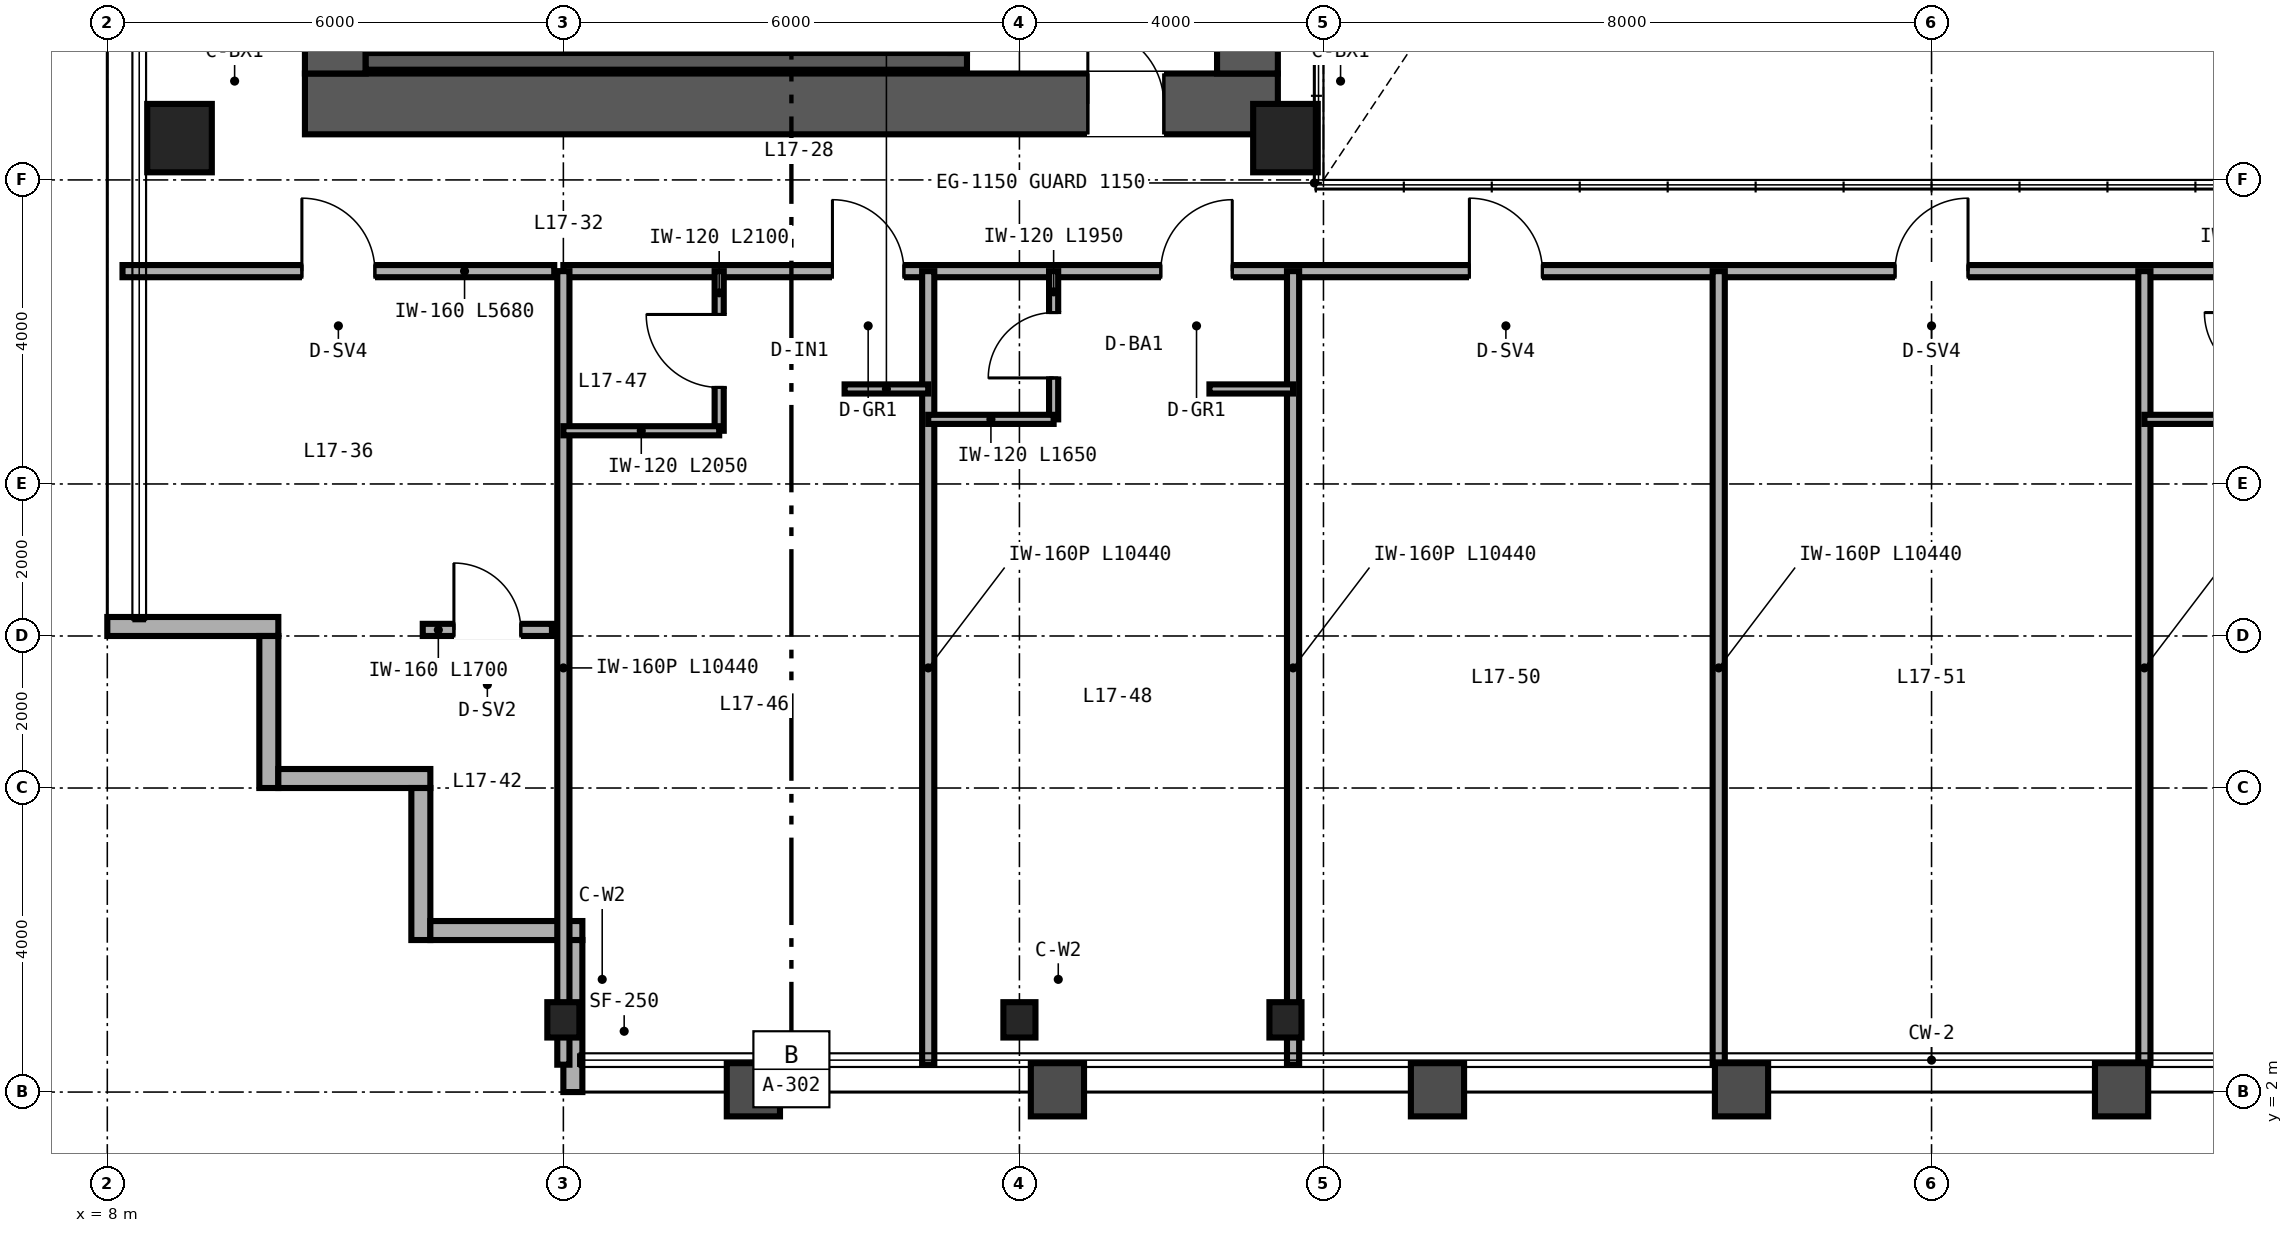
"""IFC4 building model, lengths in metres.
Left out: names, types, materials, properties, quantities, classifications, styles, units other than length and angle.
Written with IfcOpenShell. Run it as: python <this file> out.ifc"""

import sys

from ifc_helpers import new_model, si_unit, direction, frame, frame_2d, origin, origin_2d, place, context, subcontext, project, spatial, rectangle, hollow_rectangle, i_section, extrude, source, transform, mapped, element, fill, save


model = new_model("IFC4")
c1 = context("Model", 3, precision=1e-05, world=origin(), true_north=direction((0.0, 1.0)))
c2 = subcontext(c1, "Body", "Model", "MODEL_VIEW")
j1 = project(units=[si_unit("LENGTHUNIT", "METRE"), si_unit("PLANEANGLEUNIT", "RADIAN")], contexts=[c1])
p1 = place(None, origin())
s1 = spatial("IfcSite", under=j1, at=p1, CompositionType="ELEMENT")
p2 = place(p1, origin())
s2 = spatial("IfcBuilding", under=s1, at=p2, CompositionType="ELEMENT")
p3 = place(p2, frame((0.0, 0.0, 70.8)))
s3 = spatial("IfcBuildingStorey", under=s2, at=p3, CompositionType="ELEMENT", Elevation=70.8)
p4 = place(p3, frame((10.6, 15.0, 0.0), z_axis=(0.0, 0.0, 1.0), x_axis=(1.0, 0.0, 0.0)))
e1 = element("IfcWall", 1, at=p4, inside=s3, PredefinedType="SHEAR", context=c2, shape_type="SweptSolid", body=[
    extrude(rectangle(XDim=12.8, YDim=0.8, at=frame_2d((6.4, 0.0))), origin(), (0.0, 0.0, 1.0), 3.35),
])
p5 = place(p4, frame((10.3, 0.0, 0.0)))
e2 = element("IfcOpeningElement", 2, at=p5, cuts=e1, PredefinedType="OPENING", context=c2, shape_type="SweptSolid", body=[
    extrude(rectangle(XDim=1.0, YDim=2.15, at=frame_2d((0.5, 1.075))), frame((0.0, 0.41, 0.0), z_axis=(0.0, -1.0, 0.0), x_axis=(1.0, 0.0, 0.0)), (0.0, 0.0, 1.0), 0.82),
])
for number, where, z_axis, x_axis in (
    (3, (11.0, 15.4, 0.0), (0.0, 0.0, 1.0), (0.0, 1.0, 0.0)),
    (4, (23.0, 15.4, 0.0), (0.0, 0.0, 1.0), (0.0, 1.0, 0.0)),
):
    element("IfcWall", number, at=place(p3, frame(where, z_axis=z_axis, x_axis=x_axis)), inside=s3, PredefinedType="SHEAR", context=c2, shape_type="SweptSolid", body=[
        extrude(rectangle(XDim=21.2, YDim=0.8, at=frame_2d((10.6, 0.0))), origin(), (0.0, 0.0, 1.0), 3.35),
    ])
p6 = place(p3, frame((11.4, 15.56, 0.0), z_axis=(0.0, 0.0, 1.0), x_axis=(1.0, 0.0, 0.0)))
e5 = element("IfcWall", 5, at=p6, inside=s3, PredefinedType="SHEAR", context=c2, shape_type="SweptSolid", body=[
    extrude(rectangle(XDim=7.91, YDim=0.22, at=frame_2d((3.955, 0.0))), origin(), (0.0, 0.0, 1.0), 3.4),
])
for number, where, z_axis, x_axis in (
    (6, (11.56, 15.67, 0.0), (0.0, 0.0, 1.0), (0.0, 1.0, 0.0)),
    (7, (19.2, 15.67, 0.0), (0.0, 0.0, 1.0), (0.0, 1.0, 0.0)),
):
    element("IfcWall", number, at=place(p3, frame(where, z_axis=z_axis, x_axis=x_axis)), inside=s3, PredefinedType="SHEAR", context=c2, shape_type="SweptSolid", body=[
        extrude(rectangle(XDim=3.28, YDim=0.22, at=frame_2d((1.64, 0.0))), origin(), (0.0, 0.0, 1.0), 3.4),
    ])
m1 = source(origin(), c2, "Body", "SweptSolid", [
    extrude(hollow_rectangle(XDim=0.85, YDim=0.9, WallThickness=0.04, at=origin_2d()), origin(), (0.0, 0.0, 1.0), 3.35),
])
for number, where, z_axis, x_axis in (
    (8, (8.95, 14.55, 0.0), (0.0, 0.0, 1.0), (1.0, 0.0, 0.0)),
    (9, (23.5, 14.55, 0.0), (0.0, 0.0, 1.0), (1.0, 0.0, 0.0)),
):
    element("IfcColumn", number, at=place(p3, frame(where, z_axis=z_axis, x_axis=x_axis)), inside=s3, PredefinedType="COLUMN", context=c2, shape_type="MappedRepresentation", body=[
        mapped(m1, transform((0.0, 0.0, 0.0), scale=1.0)),
    ])
m2 = source(origin(), c2, "Body", "SweptSolid", [
    extrude(i_section(OverallWidth=0.422, OverallDepth=0.465, WebThickness=0.045, FlangeThickness=0.073, FilletRadius=0.025, at=origin_2d()), origin(), (0.0, 0.0, 1.0), 3.35),
])
for number, where, z_axis, x_axis in (
    (10, (14.0, 2.95, 0.0), (0.0, 0.0, 1.0), (1.0, 0.0, 0.0)),
    (11, (20.0, 2.95, 0.0), (0.0, 0.0, 1.0), (1.0, 0.0, 0.0)),
    (12, (23.5, 2.95, 0.0), (0.0, 0.0, 1.0), (1.0, 0.0, 0.0)),
):
    element("IfcColumn", number, at=place(p3, frame(where, z_axis=z_axis, x_axis=x_axis)), inside=s3, PredefinedType="COLUMN", context=c2, shape_type="MappedRepresentation", body=[
        mapped(m2, transform((0.0, 0.0, 0.0), scale=1.0)),
    ])
p7 = place(p3, frame((8.0, 8.125, 0.0), z_axis=(0.0, 0.0, 1.0), x_axis=(1.0, 0.0, 0.0)))
e13 = element("IfcWall", 13, at=p7, inside=s3, PredefinedType="SOLIDWALL", context=c2, shape_type="SweptSolid", body=[
    extrude(rectangle(XDim=2.25, YDim=0.25, at=frame_2d((1.125, 0.0))), origin(), (0.0, 0.0, 1.0), 3.35),
])
for number, where, z_axis, x_axis in (
    (14, (10.125, 8.0, 0.0), (0.0, 0.0, 1.0), (0.0, -1.0, 0.0)),
    (15, (10.25, 6.125, 0.0), (0.0, 0.0, 1.0), (1.0, 0.0, 0.0)),
    (16, (12.125, 6.0, 0.0), (0.0, 0.0, 1.0), (0.0, -1.0, 0.0)),
    (17, (12.25, 4.125, 0.0), (0.0, 0.0, 1.0), (1.0, 0.0, 0.0)),
):
    element("IfcWall", number, at=place(p3, frame(where, z_axis=z_axis, x_axis=x_axis)), inside=s3, PredefinedType="SOLIDWALL", context=c2, shape_type="SweptSolid", body=[
        extrude(rectangle(XDim=2.0, YDim=0.25, at=frame_2d((1.0, 0.0))), origin(), (0.0, 0.0, 1.0), 3.35),
    ])
p8 = place(p3, frame((14.125, 4.0, 0.0), z_axis=(0.0, 0.0, 1.0), x_axis=(0.0, -1.0, 0.0)))
e18 = element("IfcWall", 18, at=p8, inside=s3, PredefinedType="SOLIDWALL", context=c2, shape_type="SweptSolid", body=[
    extrude(rectangle(XDim=2.0, YDim=0.25, at=frame_2d((1.0, 0.0))), origin(), (0.0, 0.0, 1.0), 2.657),
])
p9 = place(p3, frame((8.2, 12.8, 0.0), z_axis=(0.0, 0.0, 1.0), x_axis=(1.0, 0.0, 0.0)))
e19 = element("IfcWall", 19, at=p9, inside=s3, PredefinedType="PARTITIONING", context=c2, shape_type="SweptSolid", body=[
    extrude(rectangle(XDim=5.68, YDim=0.16, at=frame_2d((2.84, 0.0))), origin(), (0.0, 0.0, 1.0), 3.35),
])
p10 = place(p9, frame((2.36, 0.0, 0.0)))
e20 = element("IfcOpeningElement", 20, at=p10, cuts=e19, PredefinedType="OPENING", context=c2, shape_type="SweptSolid", body=[
    extrude(rectangle(XDim=0.96, YDim=2.15, at=frame_2d((0.48, 1.075))), frame((0.0, 0.09, 0.0), z_axis=(0.0, -1.0, 0.0), x_axis=(1.0, 0.0, 0.0)), (0.0, 0.0, 1.0), 0.18),
])
p11 = place(p3, frame((12.15, 8.08, 0.0), z_axis=(0.0, 0.0, 1.0), x_axis=(1.0, 0.0, 0.0)))
e21 = element("IfcWall", 21, at=p11, inside=s3, PredefinedType="PARTITIONING", context=c2, shape_type="SweptSolid", body=[
    extrude(rectangle(XDim=1.7, YDim=0.16, at=frame_2d((0.85, 0.0))), origin(), (0.0, 0.0, 1.0), 3.35),
])
p12 = place(p11, frame((0.41, 0.0, 0.0)))
e22 = element("IfcOpeningElement", 22, at=p12, cuts=e21, PredefinedType="OPENING", context=c2, shape_type="SweptSolid", body=[
    extrude(rectangle(XDim=0.88, YDim=2.15, at=frame_2d((0.44, 1.075))), frame((0.0, 0.09, 0.0), z_axis=(0.0, -1.0, 0.0), x_axis=(1.0, 0.0, 0.0)), (0.0, 0.0, 1.0), 0.18),
])
p13 = place(p3, frame((14.0, 12.8, 0.0), z_axis=(0.0, 0.0, 1.0), x_axis=(1.0, 0.0, 0.0)))
e23 = element("IfcWall", 23, at=p13, inside=s3, PredefinedType="PARTITIONING", context=c2, shape_type="SweptSolid", body=[
    extrude(rectangle(XDim=36.0, YDim=0.16, at=frame_2d((18.0, 0.0))), origin(), (0.0, 0.0, 1.0), 2.571),
])
p14 = place(p13, frame((3.54, 0.0, 0.0)))
e24 = element("IfcOpeningElement", 24, at=p14, cuts=e23, PredefinedType="OPENING", context=c2, shape_type="SweptSolid", body=[
    extrude(rectangle(XDim=0.94, YDim=2.15, at=frame_2d((0.47, 1.075))), frame((0.0, 0.09, 0.0), z_axis=(0.0, -1.0, 0.0), x_axis=(1.0, 0.0, 0.0)), (0.0, 0.0, 1.0), 0.18),
])
p15 = place(p13, frame((7.86, 0.0, 0.0)))
e25 = element("IfcOpeningElement", 25, at=p15, cuts=e23, PredefinedType="OPENING", context=c2, shape_type="SweptSolid", body=[
    extrude(rectangle(XDim=0.94, YDim=2.15, at=frame_2d((0.47, 1.075))), frame((0.0, 0.09, 0.0), z_axis=(0.0, -1.0, 0.0), x_axis=(1.0, 0.0, 0.0)), (0.0, 0.0, 1.0), 0.18),
])
p16 = place(p13, frame((11.92, 0.0, 0.0)))
e26 = element("IfcOpeningElement", 26, at=p16, cuts=e23, PredefinedType="OPENING", context=c2, shape_type="SweptSolid", body=[
    extrude(rectangle(XDim=0.96, YDim=2.15, at=frame_2d((0.48, 1.075))), frame((0.0, 0.09, 0.0), z_axis=(0.0, -1.0, 0.0), x_axis=(1.0, 0.0, 0.0)), (0.0, 0.0, 1.0), 0.18),
])
p17 = place(p13, frame((17.52, 0.0, 0.0)))
e27 = element("IfcOpeningElement", 27, at=p17, cuts=e23, PredefinedType="OPENING", context=c2, shape_type="SweptSolid", body=[
    extrude(rectangle(XDim=0.96, YDim=2.15, at=frame_2d((0.48, 1.075))), frame((0.0, 0.09, 0.0), z_axis=(0.0, -1.0, 0.0), x_axis=(1.0, 0.0, 0.0)), (0.0, 0.0, 1.0), 0.18),
])
p18 = place(p13, frame((24.74, 0.0, 0.0)))
e28 = element("IfcOpeningElement", 28, at=p18, cuts=e23, PredefinedType="OPENING", context=c2, shape_type="SweptSolid", body=[
    extrude(rectangle(XDim=0.94, YDim=2.15, at=frame_2d((0.47, 1.075))), frame((0.0, 0.09, 0.0), z_axis=(0.0, -1.0, 0.0), x_axis=(1.0, 0.0, 0.0)), (0.0, 0.0, 1.0), 0.18),
])
p19 = place(p13, frame((29.74, 0.0, 0.0)))
e29 = element("IfcOpeningElement", 29, at=p19, cuts=e23, PredefinedType="OPENING", context=c2, shape_type="SweptSolid", body=[
    extrude(rectangle(XDim=0.94, YDim=2.15, at=frame_2d((0.47, 1.075))), frame((0.0, 0.09, 0.0), z_axis=(0.0, -1.0, 0.0), x_axis=(1.0, 0.0, 0.0)), (0.0, 0.0, 1.0), 0.18),
])
p20 = place(p13, frame((33.02, 0.0, 0.0)))
e30 = element("IfcOpeningElement", 30, at=p20, cuts=e23, PredefinedType="OPENING", context=c2, shape_type="SweptSolid", body=[
    extrude(rectangle(XDim=0.96, YDim=2.15, at=frame_2d((0.48, 1.075))), frame((0.0, 0.09, 0.0), z_axis=(0.0, -1.0, 0.0), x_axis=(1.0, 0.0, 0.0)), (0.0, 0.0, 1.0), 0.18),
])
for number, where, z_axis, x_axis in (
    (31, (14.0, 2.36, 0.0), (0.0, 0.0, 1.0), (0.0, 1.0, 0.0)),
    (32, (18.8, 2.36, 0.0), (0.0, 0.0, 1.0), (0.0, 1.0, 0.0)),
):
    element("IfcWall", number, at=place(p3, frame(where, z_axis=z_axis, x_axis=x_axis)), inside=s3, PredefinedType="PARTITIONING", context=c2, shape_type="SweptSolid", body=[
        extrude(rectangle(XDim=10.44, YDim=0.16, at=frame_2d((5.22, 0.0))), origin(), (0.0, 0.0, 1.0), 2.657),
    ])
p21 = place(p3, frame((16.05, 10.7, 0.0), z_axis=(0.0, 0.0, 1.0), x_axis=(0.0, 1.0, 0.0)))
e33 = element("IfcWall", 33, at=p21, inside=s3, PredefinedType="PARTITIONING", context=c2, shape_type="SweptSolid", body=[
    extrude(rectangle(XDim=2.1, YDim=0.12, at=frame_2d((1.05, 0.0))), origin(), (0.0, 0.0, 1.0), 3.35),
])
p22 = place(p21, frame((0.57, 0.0, 0.0)))
e34 = element("IfcOpeningElement", 34, at=p22, cuts=e33, PredefinedType="OPENING", context=c2, shape_type="SweptSolid", body=[
    extrude(rectangle(XDim=0.96, YDim=2.15, at=frame_2d((0.48, 1.075))), frame((0.0, 0.07, 0.0), z_axis=(0.0, -1.0, 0.0), x_axis=(1.0, 0.0, 0.0)), (0.0, 0.0, 1.0), 0.14),
])
p23 = place(p3, frame((14.0, 10.7, 0.0), z_axis=(0.0, 0.0, 1.0), x_axis=(1.0, 0.0, 0.0)))
e35 = element("IfcWall", 35, at=p23, inside=s3, PredefinedType="PARTITIONING", context=c2, shape_type="SweptSolid", body=[
    extrude(rectangle(XDim=2.05, YDim=0.12, at=frame_2d((1.025, 0.0))), origin(), (0.0, 0.0, 1.0), 3.35),
])
p24 = place(p3, frame((17.7, 11.25, 0.0), z_axis=(0.0, 0.0, 1.0), x_axis=(1.0, 0.0, 0.0)))
e36 = element("IfcWall", 36, at=p24, inside=s3, PredefinedType="PARTITIONING", context=c2, shape_type="SweptSolid", body=[
    extrude(rectangle(XDim=1.1, YDim=0.12, at=frame_2d((0.55, 0.0))), origin(), (0.0, 0.0, 1.0), 3.35),
])
p25 = place(p3, frame((23.6, 2.36, 0.0), z_axis=(0.0, 0.0, 1.0), x_axis=(0.0, 1.0, 0.0)))
e37 = element("IfcWall", 37, at=p25, inside=s3, PredefinedType="PARTITIONING", context=c2, shape_type="SweptSolid", body=[
    extrude(rectangle(XDim=10.44, YDim=0.16, at=frame_2d((5.22, 0.0))), origin(), (0.0, 0.0, 1.0), 2.423),
])
p26 = place(p3, frame((20.45, 10.85, 0.0), z_axis=(0.0, 0.0, 1.0), x_axis=(0.0, 1.0, 0.0)))
e38 = element("IfcWall", 38, at=p26, inside=s3, PredefinedType="PARTITIONING", context=c2, shape_type="SweptSolid", body=[
    extrude(rectangle(XDim=1.95, YDim=0.12, at=frame_2d((0.975, 0.0))), origin(), (0.0, 0.0, 1.0), 3.35),
])
p27 = place(p26, frame((0.545, 0.0, 0.0)))
e39 = element("IfcOpeningElement", 39, at=p27, cuts=e38, PredefinedType="OPENING", context=c2, shape_type="SweptSolid", body=[
    extrude(rectangle(XDim=0.86, YDim=2.1, at=frame_2d((0.43, 1.05))), frame((0.0, 0.07, 0.0), z_axis=(0.0, -1.0, 0.0), x_axis=(1.0, 0.0, 0.0)), (0.0, 0.0, 1.0), 0.14),
])
p28 = place(p3, frame((18.8, 10.85, 0.0), z_axis=(0.0, 0.0, 1.0), x_axis=(1.0, 0.0, 0.0)))
e40 = element("IfcWall", 40, at=p28, inside=s3, PredefinedType="PARTITIONING", context=c2, shape_type="SweptSolid", body=[
    extrude(rectangle(XDim=1.65, YDim=0.12, at=frame_2d((0.825, 0.0))), origin(), (0.0, 0.0, 1.0), 3.35),
])
p29 = place(p3, frame((22.5, 11.25, 0.0), z_axis=(0.0, 0.0, 1.0), x_axis=(1.0, 0.0, 0.0)))
e41 = element("IfcWall", 41, at=p29, inside=s3, PredefinedType="PARTITIONING", context=c2, shape_type="SweptSolid", body=[
    extrude(rectangle(XDim=1.1, YDim=0.12, at=frame_2d((0.55, 0.0))), origin(), (0.0, 0.0, 1.0), 2.571),
])
for number, where, z_axis, x_axis in (
    (42, (29.2, 2.36, 0.0), (0.0, 0.0, 1.0), (0.0, 1.0, 0.0)),
    (43, (34.8, 2.36, 0.0), (0.0, 0.0, 1.0), (0.0, 1.0, 0.0)),
):
    element("IfcWall", number, at=place(p3, frame(where, z_axis=z_axis, x_axis=x_axis)), inside=s3, PredefinedType="PARTITIONING", context=c2, shape_type="SweptSolid", body=[
        extrude(rectangle(XDim=10.44, YDim=0.16, at=frame_2d((5.22, 0.0))), origin(), (0.0, 0.0, 1.0), 2.423),
    ])
p30 = place(p3, frame((34.8, 10.85, 0.0), z_axis=(0.0, 0.0, 1.0), x_axis=(1.0, 0.0, 0.0)))
e44 = element("IfcWall", 44, at=p30, inside=s3, PredefinedType="PARTITIONING", context=c2, shape_type="SweptSolid", body=[
    extrude(rectangle(XDim=1.65, YDim=0.12, at=frame_2d((0.825, 0.0))), origin(), (0.0, 0.0, 1.0), 3.35),
])
m3 = source(origin(), c2, "Body", "SweptSolid", [
    extrude(rectangle(XDim=1.0, YDim=2.15, at=frame_2d((0.5, 1.075))), frame((0.0, 0.025, 0.0), z_axis=(0.0, -1.0, 0.0), x_axis=(1.0, 0.0, 0.0)), (0.0, 0.0, 1.0), 0.05),
])
p31 = place(p5, origin())
e45 = element("IfcDoor", 45, at=p31, inside=s3, OperationType="SINGLE_SWING_LEFT", PredefinedType="DOOR", context=c2, shape_type="MappedRepresentation", body=[
    mapped(m3, transform((0.0, 0.0, 0.0), scale=1.0)),
])
fill(e2, e45)
m4 = source(origin(), c2, "Body", "SweptSolid", [
    extrude(rectangle(XDim=0.96, YDim=2.15, at=frame_2d((0.48, 1.075))), frame((0.0, 0.025, 0.0), z_axis=(0.0, -1.0, 0.0), x_axis=(1.0, 0.0, 0.0)), (0.0, 0.0, 1.0), 0.05),
])
p32 = place(p10, origin())
e46 = element("IfcDoor", 46, at=p32, inside=s3, OperationType="SINGLE_SWING_LEFT", PredefinedType="DOOR", context=c2, shape_type="MappedRepresentation", body=[
    mapped(m4, transform((0.0, 0.0, 0.0), scale=1.0)),
])
fill(e20, e46)
m5 = source(origin(), c2, "Body", "SweptSolid", [
    extrude(rectangle(XDim=0.88, YDim=2.15, at=frame_2d((0.44, 1.075))), frame((0.0, 0.025, 0.0), z_axis=(0.0, -1.0, 0.0), x_axis=(1.0, 0.0, 0.0)), (0.0, 0.0, 1.0), 0.05),
])
p33 = place(p12, origin())
e47 = element("IfcDoor", 47, at=p33, inside=s3, OperationType="SINGLE_SWING_LEFT", PredefinedType="DOOR", context=c2, shape_type="MappedRepresentation", body=[
    mapped(m5, transform((0.0, 0.0, 0.0), scale=1.0)),
])
fill(e22, e47)
p34 = place(p22, origin())
e48 = element("IfcDoor", 48, at=p34, inside=s3, OperationType="SINGLE_SWING_RIGHT", PredefinedType="DOOR", context=c2, shape_type="MappedRepresentation", body=[
    mapped(m4, transform((0.0, 0.0, 0.0), scale=1.0)),
])
fill(e34, e48)
m6 = source(origin(), c2, "Body", "SweptSolid", [
    extrude(rectangle(XDim=0.86, YDim=2.1, at=frame_2d((0.43, 1.05))), frame((0.0, 0.025, 0.0), z_axis=(0.0, -1.0, 0.0), x_axis=(1.0, 0.0, 0.0)), (0.0, 0.0, 1.0), 0.05),
])
p35 = place(p27, origin())
e49 = element("IfcDoor", 49, at=p35, inside=s3, OperationType="SINGLE_SWING_LEFT", PredefinedType="DOOR", context=c2, shape_type="MappedRepresentation", body=[
    mapped(m6, transform((0.0, 0.0, 0.0), scale=1.0)),
])
fill(e39, e49)
m7 = source(origin(), c2, "Body", "SweptSolid", [
    extrude(rectangle(XDim=0.94, YDim=2.15, at=frame_2d((0.47, 1.075))), frame((0.0, 0.025, 0.0), z_axis=(0.0, -1.0, 0.0), x_axis=(1.0, 0.0, 0.0)), (0.0, 0.0, 1.0), 0.05),
])
p36 = place(p14, origin())
e50 = element("IfcDoor", 50, at=p36, inside=s3, OperationType="SINGLE_SWING_LEFT", PredefinedType="DOOR", context=c2, shape_type="MappedRepresentation", body=[
    mapped(m7, transform((0.0, 0.0, 0.0), scale=1.0)),
])
fill(e24, e50)
p37 = place(p15, origin())
e51 = element("IfcDoor", 51, at=p37, inside=s3, OperationType="SINGLE_SWING_RIGHT", PredefinedType="DOOR", context=c2, shape_type="MappedRepresentation", body=[
    mapped(m7, transform((0.0, 0.0, 0.0), scale=1.0)),
])
fill(e25, e51)
p38 = place(p16, origin())
e52 = element("IfcDoor", 52, at=p38, inside=s3, OperationType="SINGLE_SWING_LEFT", PredefinedType="DOOR", context=c2, shape_type="MappedRepresentation", body=[
    mapped(m4, transform((0.0, 0.0, 0.0), scale=1.0)),
])
fill(e26, e52)
p39 = place(p17, origin())
e53 = element("IfcDoor", 53, at=p39, inside=s3, OperationType="SINGLE_SWING_RIGHT", PredefinedType="DOOR", context=c2, shape_type="MappedRepresentation", body=[
    mapped(m4, transform((0.0, 0.0, 0.0), scale=1.0)),
])
fill(e27, e53)
save(model, sys.argv[1])
